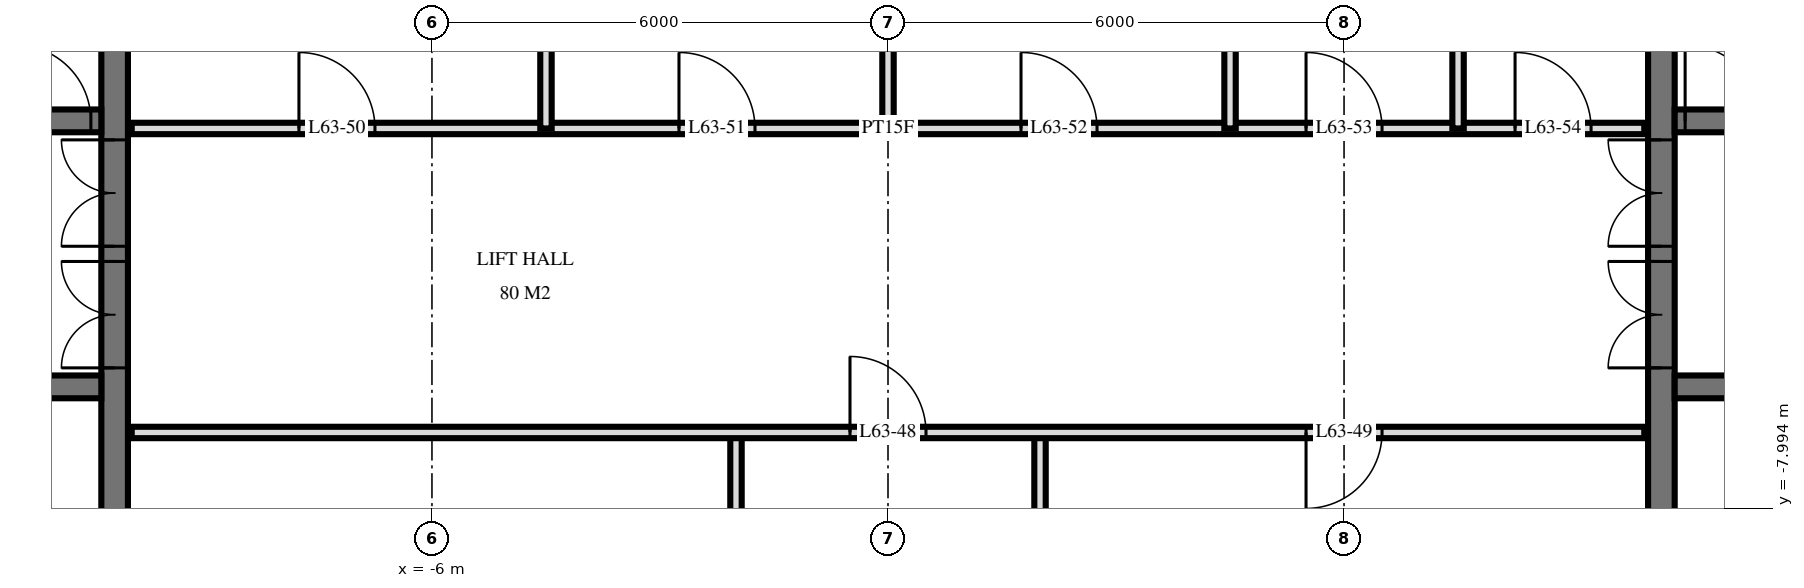
"""IFC4 building model, lengths in metres.
Left out: names, types, materials, properties, quantities, classifications, styles, units other than length and angle.
Written with IfcOpenShell. Run it as: python <this file> out.ifc"""

import sys

from ifc_helpers import new_model, si_unit, direction, frame, frame_2d, origin, place, context, subcontext, project, spatial, rectangle, extrude, element, fill, save


model = new_model("IFC4")
c1 = context("Model", 3, precision=1e-05, world=origin(), true_north=direction((0.0, 1.0)))
c2 = subcontext(c1, "Body", "Model", "MODEL_VIEW")
j1 = project(units=[si_unit("LENGTHUNIT", "METRE"), si_unit("PLANEANGLEUNIT", "RADIAN")], contexts=[c1])
p1 = place(None, origin())
s1 = spatial("IfcSite", under=j1, at=p1, CompositionType="ELEMENT")
p2 = place(p1, origin())
s2 = spatial("IfcBuilding", under=s1, at=p2, CompositionType="ELEMENT")
p3 = place(p2, frame((0.0, 0.0, 239.6)))
s3 = spatial("IfcBuildingStorey", under=s2, at=p3, CompositionType="ELEMENT", Elevation=239.6)
p4 = place(p3, frame((-10.175, -14.55, 0.0), z_axis=(0.0, 0.0, 1.0), x_axis=(0.0, 1.0, 0.0)))
e1 = element("IfcWall", 1, at=p4, inside=s3, PredefinedType="SHEAR", context=c2, shape_type="SweptSolid", body=[
    extrude(rectangle(XDim=14.1, YDim=0.35, at=frame_2d((7.05, 0.0))), origin(), (0.0, 0.0, 1.0), 3.5),
])
p5 = place(p4, frame((8.4, 0.0, 0.0)))
e2 = element("IfcOpeningElement", 2, at=p5, cuts=e1, PredefinedType="OPENING", context=c2, shape_type="SweptSolid", body=[
    extrude(rectangle(XDim=1.4, YDim=2.4, at=frame_2d((0.7, 1.2))), frame((0.0, 0.185, 0.0), z_axis=(0.0, -1.0, 0.0), x_axis=(1.0, 0.0, 0.0)), (0.0, 0.0, 1.0), 0.37),
])
p6 = place(p4, frame((10.0, 0.0, 0.0)))
e3 = element("IfcOpeningElement", 3, at=p6, cuts=e1, PredefinedType="OPENING", context=c2, shape_type="SweptSolid", body=[
    extrude(rectangle(XDim=1.4, YDim=2.4, at=frame_2d((0.7, 1.2))), frame((0.0, 0.185, 0.0), z_axis=(0.0, -1.0, 0.0), x_axis=(1.0, 0.0, 0.0)), (0.0, 0.0, 1.0), 0.37),
])
p7 = place(p4, frame((4.0, 0.0, 0.0)))
e4 = element("IfcOpeningElement", 4, at=p7, cuts=e1, PredefinedType="OPENING", context=c2, shape_type="SweptSolid", body=[
    extrude(rectangle(XDim=1.2, YDim=2.1, at=frame_2d((0.6, 1.05))), frame((0.0, 0.185, 0.0), z_axis=(0.0, -1.0, 0.0), x_axis=(1.0, 0.0, 0.0)), (0.0, 0.0, 1.0), 0.37),
])
p8 = place(p3, frame((-24.05, -2.9, 0.0), z_axis=(0.0, 0.0, 1.0), x_axis=(1.0, 0.0, 0.0)))
e5 = element("IfcWall", 5, at=p8, inside=s3, PredefinedType="SHEAR", context=c2, shape_type="SweptSolid", body=[
    extrude(rectangle(XDim=13.7, YDim=0.3, at=frame_2d((6.85, 0.0))), origin(), (0.0, 0.0, 1.0), 3.5),
])
p9 = place(p8, frame((0.55, 0.0, 0.0)))
e6 = element("IfcOpeningElement", 6, at=p9, cuts=e5, PredefinedType="OPENING", context=c2, shape_type="SweptSolid", body=[
    extrude(rectangle(XDim=1.1, YDim=2.1, at=frame_2d((0.55, 1.05))), frame((0.0, 0.16, 0.0), z_axis=(0.0, -1.0, 0.0), x_axis=(1.0, 0.0, 0.0)), (0.0, 0.0, 1.0), 0.32),
])
p10 = place(p8, frame((6.613, 0.0, 0.0)))
e7 = element("IfcOpeningElement", 7, at=p10, cuts=e5, PredefinedType="OPENING", context=c2, shape_type="SweptSolid", body=[
    extrude(rectangle(XDim=0.9, YDim=2.1, at=frame_2d((0.45, 1.05))), frame((0.0, 0.16, 0.0), z_axis=(0.0, -1.0, 0.0), x_axis=(1.0, 0.0, 0.0)), (0.0, 0.0, 1.0), 0.32),
])
p11 = place(p8, frame((5.188, 0.0, 0.0)))
e8 = element("IfcOpeningElement", 8, at=p11, cuts=e5, PredefinedType="OPENING", context=c2, shape_type="SweptSolid", body=[
    extrude(rectangle(XDim=0.9, YDim=2.1, at=frame_2d((0.45, 1.05))), frame((0.0, 0.16, 0.0), z_axis=(0.0, -1.0, 0.0), x_axis=(1.0, 0.0, 0.0)), (0.0, 0.0, 1.0), 0.32),
])
p12 = place(p8, frame((12.562, 0.0, 0.0)))
e9 = element("IfcOpeningElement", 9, at=p12, cuts=e5, PredefinedType="OPENING", context=c2, shape_type="SweptSolid", body=[
    extrude(rectangle(XDim=1.0, YDim=2.1, at=frame_2d((0.5, 1.05))), frame((0.0, 0.16, 0.0), z_axis=(0.0, -1.0, 0.0), x_axis=(1.0, 0.0, 0.0)), (0.0, 0.0, 1.0), 0.32),
])
p13 = place(p8, frame((11.137, 0.0, 0.0)))
e10 = element("IfcOpeningElement", 10, at=p13, cuts=e5, PredefinedType="OPENING", context=c2, shape_type="SweptSolid", body=[
    extrude(rectangle(XDim=1.0, YDim=2.1, at=frame_2d((0.5, 1.05))), frame((0.0, 0.16, 0.0), z_axis=(0.0, -1.0, 0.0), x_axis=(1.0, 0.0, 0.0)), (0.0, 0.0, 1.0), 0.32),
])
p14 = place(p8, frame((8.85, 0.0, 0.0)))
e11 = element("IfcOpeningElement", 11, at=p14, cuts=e5, PredefinedType="OPENING", context=c2, shape_type="SweptSolid", body=[
    extrude(rectangle(XDim=1.0, YDim=2.1, at=frame_2d((0.5, 1.05))), frame((0.0, 0.16, 0.0), z_axis=(0.0, -1.0, 0.0), x_axis=(1.0, 0.0, 0.0)), (0.0, 0.0, 1.0), 0.32),
])
p15 = place(p8, frame((3.0, 0.0, 0.0)))
e12 = element("IfcOpeningElement", 12, at=p15, cuts=e5, PredefinedType="OPENING", context=c2, shape_type="SweptSolid", body=[
    extrude(rectangle(XDim=1.0, YDim=2.1, at=frame_2d((0.5, 1.05))), frame((0.0, 0.16, 0.0), z_axis=(0.0, -1.0, 0.0), x_axis=(1.0, 0.0, 0.0)), (0.0, 0.0, 1.0), 0.32),
])
p16 = place(p3, frame((-24.05, -6.4, 0.0), z_axis=(0.0, 0.0, 1.0), x_axis=(1.0, 0.0, 0.0)))
e13 = element("IfcWall", 13, at=p16, inside=s3, PredefinedType="SHEAR", context=c2, shape_type="SweptSolid", body=[
    extrude(rectangle(XDim=13.7, YDim=0.3, at=frame_2d((6.85, 0.0))), origin(), (0.0, 0.0, 1.0), 3.5),
])
p17 = place(p16, frame((0.55, 0.0, 0.0)))
e14 = element("IfcOpeningElement", 14, at=p17, cuts=e13, PredefinedType="OPENING", context=c2, shape_type="SweptSolid", body=[
    extrude(rectangle(XDim=1.1, YDim=2.1, at=frame_2d((0.55, 1.05))), frame((0.0, 0.16, 0.0), z_axis=(0.0, -1.0, 0.0), x_axis=(1.0, 0.0, 0.0)), (0.0, 0.0, 1.0), 0.32),
])
p18 = place(p16, frame((5.8, 0.0, 0.0)))
e15 = element("IfcOpeningElement", 15, at=p18, cuts=e13, PredefinedType="OPENING", context=c2, shape_type="SweptSolid", body=[
    extrude(rectangle(XDim=1.1, YDim=2.1, at=frame_2d((0.55, 1.05))), frame((0.0, 0.16, 0.0), z_axis=(0.0, -1.0, 0.0), x_axis=(1.0, 0.0, 0.0)), (0.0, 0.0, 1.0), 0.32),
])
p19 = place(p3, frame((10.175, -14.55, 0.0), z_axis=(0.0, 0.0, 1.0), x_axis=(0.0, 1.0, 0.0)))
e16 = element("IfcWall", 16, at=p19, inside=s3, PredefinedType="SHEAR", context=c2, shape_type="SweptSolid", body=[
    extrude(rectangle(XDim=14.1, YDim=0.35, at=frame_2d((7.05, 0.0))), origin(), (0.0, 0.0, 1.0), 3.5),
])
p20 = place(p19, frame((8.4, 0.0, 0.0)))
e17 = element("IfcOpeningElement", 17, at=p20, cuts=e16, PredefinedType="OPENING", context=c2, shape_type="SweptSolid", body=[
    extrude(rectangle(XDim=1.4, YDim=2.4, at=frame_2d((0.7, 1.2))), frame((0.0, 0.185, 0.0), z_axis=(0.0, -1.0, 0.0), x_axis=(1.0, 0.0, 0.0)), (0.0, 0.0, 1.0), 0.37),
])
p21 = place(p19, frame((10.0, 0.0, 0.0)))
e18 = element("IfcOpeningElement", 18, at=p21, cuts=e16, PredefinedType="OPENING", context=c2, shape_type="SweptSolid", body=[
    extrude(rectangle(XDim=1.4, YDim=2.4, at=frame_2d((0.7, 1.2))), frame((0.0, 0.185, 0.0), z_axis=(0.0, -1.0, 0.0), x_axis=(1.0, 0.0, 0.0)), (0.0, 0.0, 1.0), 0.37),
])
p22 = place(p19, frame((4.0, 0.0, 0.0)))
e19 = element("IfcOpeningElement", 19, at=p22, cuts=e16, PredefinedType="OPENING", context=c2, shape_type="SweptSolid", body=[
    extrude(rectangle(XDim=1.2, YDim=2.1, at=frame_2d((0.6, 1.05))), frame((0.0, 0.185, 0.0), z_axis=(0.0, -1.0, 0.0), x_axis=(1.0, 0.0, 0.0)), (0.0, 0.0, 1.0), 0.37),
])
p23 = place(p3, frame((10.35, -2.9, 0.0), z_axis=(0.0, 0.0, 1.0), x_axis=(1.0, 0.0, 0.0)))
e20 = element("IfcWall", 20, at=p23, inside=s3, PredefinedType="SHEAR", context=c2, shape_type="SweptSolid", body=[
    extrude(rectangle(XDim=13.7, YDim=0.3, at=frame_2d((6.85, 0.0))), origin(), (0.0, 0.0, 1.0), 3.5),
])
p24 = place(p23, frame((12.05, 0.0, 0.0)))
e21 = element("IfcOpeningElement", 21, at=p24, cuts=e20, PredefinedType="OPENING", context=c2, shape_type="SweptSolid", body=[
    extrude(rectangle(XDim=1.1, YDim=2.1, at=frame_2d((0.55, 1.05))), frame((0.0, 0.16, 0.0), z_axis=(0.0, -1.0, 0.0), x_axis=(1.0, 0.0, 0.0)), (0.0, 0.0, 1.0), 0.32),
])
p25 = place(p23, frame((6.188, 0.0, 0.0)))
e22 = element("IfcOpeningElement", 22, at=p25, cuts=e20, PredefinedType="OPENING", context=c2, shape_type="SweptSolid", body=[
    extrude(rectangle(XDim=0.9, YDim=2.1, at=frame_2d((0.45, 1.05))), frame((0.0, 0.16, 0.0), z_axis=(0.0, -1.0, 0.0), x_axis=(1.0, 0.0, 0.0)), (0.0, 0.0, 1.0), 0.32),
])
p26 = place(p23, frame((7.613, 0.0, 0.0)))
e23 = element("IfcOpeningElement", 23, at=p26, cuts=e20, PredefinedType="OPENING", context=c2, shape_type="SweptSolid", body=[
    extrude(rectangle(XDim=0.9, YDim=2.1, at=frame_2d((0.45, 1.05))), frame((0.0, 0.16, 0.0), z_axis=(0.0, -1.0, 0.0), x_axis=(1.0, 0.0, 0.0)), (0.0, 0.0, 1.0), 0.32),
])
p27 = place(p23, frame((0.137, 0.0, 0.0)))
e24 = element("IfcOpeningElement", 24, at=p27, cuts=e20, PredefinedType="OPENING", context=c2, shape_type="SweptSolid", body=[
    extrude(rectangle(XDim=1.0, YDim=2.1, at=frame_2d((0.5, 1.05))), frame((0.0, 0.16, 0.0), z_axis=(0.0, -1.0, 0.0), x_axis=(1.0, 0.0, 0.0)), (0.0, 0.0, 1.0), 0.32),
])
p28 = place(p23, frame((1.562, 0.0, 0.0)))
e25 = element("IfcOpeningElement", 25, at=p28, cuts=e20, PredefinedType="OPENING", context=c2, shape_type="SweptSolid", body=[
    extrude(rectangle(XDim=1.0, YDim=2.1, at=frame_2d((0.5, 1.05))), frame((0.0, 0.16, 0.0), z_axis=(0.0, -1.0, 0.0), x_axis=(1.0, 0.0, 0.0)), (0.0, 0.0, 1.0), 0.32),
])
p29 = place(p23, frame((3.85, 0.0, 0.0)))
e26 = element("IfcOpeningElement", 26, at=p29, cuts=e20, PredefinedType="OPENING", context=c2, shape_type="SweptSolid", body=[
    extrude(rectangle(XDim=1.0, YDim=2.1, at=frame_2d((0.5, 1.05))), frame((0.0, 0.16, 0.0), z_axis=(0.0, -1.0, 0.0), x_axis=(1.0, 0.0, 0.0)), (0.0, 0.0, 1.0), 0.32),
])
p30 = place(p23, frame((9.7, 0.0, 0.0)))
e27 = element("IfcOpeningElement", 27, at=p30, cuts=e20, PredefinedType="OPENING", context=c2, shape_type="SweptSolid", body=[
    extrude(rectangle(XDim=1.0, YDim=2.1, at=frame_2d((0.5, 1.05))), frame((0.0, 0.16, 0.0), z_axis=(0.0, -1.0, 0.0), x_axis=(1.0, 0.0, 0.0)), (0.0, 0.0, 1.0), 0.32),
])
p31 = place(p3, frame((10.35, -6.4, 0.0), z_axis=(0.0, 0.0, 1.0), x_axis=(1.0, 0.0, 0.0)))
e28 = element("IfcWall", 28, at=p31, inside=s3, PredefinedType="SHEAR", context=c2, shape_type="SweptSolid", body=[
    extrude(rectangle(XDim=13.7, YDim=0.3, at=frame_2d((6.85, 0.0))), origin(), (0.0, 0.0, 1.0), 3.5),
])
p32 = place(p31, frame((12.05, 0.0, 0.0)))
e29 = element("IfcOpeningElement", 29, at=p32, cuts=e28, PredefinedType="OPENING", context=c2, shape_type="SweptSolid", body=[
    extrude(rectangle(XDim=1.1, YDim=2.1, at=frame_2d((0.55, 1.05))), frame((0.0, 0.16, 0.0), z_axis=(0.0, -1.0, 0.0), x_axis=(1.0, 0.0, 0.0)), (0.0, 0.0, 1.0), 0.32),
])
p33 = place(p31, frame((6.8, 0.0, 0.0)))
e30 = element("IfcOpeningElement", 30, at=p33, cuts=e28, PredefinedType="OPENING", context=c2, shape_type="SweptSolid", body=[
    extrude(rectangle(XDim=1.1, YDim=2.1, at=frame_2d((0.55, 1.05))), frame((0.0, 0.16, 0.0), z_axis=(0.0, -1.0, 0.0), x_axis=(1.0, 0.0, 0.0)), (0.0, 0.0, 1.0), 0.32),
])
for number, where, z_axis, x_axis in (
    (31, (7.5, -3.0, 0.0), (0.0, 0.0, 1.0), (0.0, 1.0, 0.0)),
    (32, (4.5, -3.0, 0.0), (0.0, 0.0, 1.0), (0.0, 1.0, 0.0)),
):
    element("IfcWall", number, at=place(p3, frame(where, z_axis=z_axis, x_axis=x_axis)), inside=s3, PredefinedType="PLUMBINGWALL", context=c2, shape_type="SweptSolid", body=[
        extrude(rectangle(XDim=4.02, YDim=0.15, at=frame_2d((2.01, 0.0))), origin(), (0.0, 0.0, 1.0), 3.22),
    ])
p34 = place(p3, frame((2.0, -11.0, 0.0), z_axis=(0.0, 0.0, 1.0), x_axis=(0.0, 1.0, 0.0)))
e33 = element("IfcWall", 33, at=p34, inside=s3, PredefinedType="PARTITIONING", context=c2, shape_type="SweptSolid", body=[
    extrude(rectangle(XDim=4.0, YDim=0.15, at=frame_2d((2.0, 0.0))), origin(), (0.0, 0.0, 1.0), 3.22),
])
p35 = place(p3, frame((0.0, -3.0, 0.0), z_axis=(0.0, 0.0, 1.0), x_axis=(0.0, 1.0, 0.0)))
e34 = element("IfcWall", 34, at=p35, inside=s3, PredefinedType="PARTITIONING", context=c2, shape_type="SweptSolid", body=[
    extrude(rectangle(XDim=4.02, YDim=0.15, at=frame_2d((2.01, 0.0))), origin(), (0.0, 0.0, 1.0), 3.22),
])
p36 = place(p3, frame((-2.0, -11.0, 0.0), z_axis=(0.0, 0.0, 1.0), x_axis=(0.0, 1.0, 0.0)))
e35 = element("IfcWall", 35, at=p36, inside=s3, PredefinedType="PARTITIONING", context=c2, shape_type="SweptSolid", body=[
    extrude(rectangle(XDim=4.0, YDim=0.15, at=frame_2d((2.0, 0.0))), origin(), (0.0, 0.0, 1.0), 3.22),
])
p37 = place(p3, frame((-4.5, -3.0, 0.0), z_axis=(0.0, 0.0, 1.0), x_axis=(0.0, 1.0, 0.0)))
e36 = element("IfcWall", 36, at=p37, inside=s3, PredefinedType="PARTITIONING", context=c2, shape_type="SweptSolid", body=[
    extrude(rectangle(XDim=4.02, YDim=0.15, at=frame_2d((2.01, 0.0))), origin(), (0.0, 0.0, 1.0), 3.22),
])
p38 = place(p3, frame((-9.95, -7.0, 0.0), z_axis=(0.0, 0.0, 1.0), x_axis=(1.0, 0.0, 0.0)))
e37 = element("IfcWall", 37, at=p38, inside=s3, PredefinedType="PARTITIONING", context=c2, shape_type="SweptSolid", body=[
    extrude(rectangle(XDim=19.9, YDim=0.15, at=frame_2d((9.95, 0.0))), origin(), (0.0, 0.0, 1.0), 3.22),
])
p39 = place(p38, frame((9.45, 0.0, 0.0)))
e38 = element("IfcOpeningElement", 38, at=p39, cuts=e37, PredefinedType="OPENING", context=c2, shape_type="SweptSolid", body=[
    extrude(rectangle(XDim=1.0, YDim=2.1, at=frame_2d((0.5, 1.05))), frame((0.0, 0.085, 0.0), z_axis=(0.0, -1.0, 0.0), x_axis=(1.0, 0.0, 0.0)), (0.0, 0.0, 1.0), 0.17),
])
p40 = place(p38, frame((15.45, 0.0, 0.0)))
e39 = element("IfcOpeningElement", 39, at=p40, cuts=e37, PredefinedType="OPENING", context=c2, shape_type="SweptSolid", body=[
    extrude(rectangle(XDim=1.0, YDim=2.1, at=frame_2d((0.5, 1.05))), frame((0.0, 0.085, 0.0), z_axis=(0.0, -1.0, 0.0), x_axis=(1.0, 0.0, 0.0)), (0.0, 0.0, 1.0), 0.17),
])
p41 = place(p3, frame((-9.95, -3.0, 0.0), z_axis=(0.0, 0.0, 1.0), x_axis=(1.0, 0.0, 0.0)))
e40 = element("IfcWall", 40, at=p41, inside=s3, PredefinedType="PARTITIONING", context=c2, shape_type="SweptSolid", body=[
    extrude(rectangle(XDim=19.9, YDim=0.15, at=frame_2d((9.95, 0.0))), origin(), (0.0, 0.0, 1.0), 3.22),
])
p42 = place(p41, frame((2.2, 0.0, 0.0)))
e41 = element("IfcOpeningElement", 41, at=p42, cuts=e40, PredefinedType="OPENING", context=c2, shape_type="SweptSolid", body=[
    extrude(rectangle(XDim=1.0, YDim=2.1, at=frame_2d((0.5, 1.05))), frame((0.0, 0.085, 0.0), z_axis=(0.0, -1.0, 0.0), x_axis=(1.0, 0.0, 0.0)), (0.0, 0.0, 1.0), 0.17),
])
p43 = place(p41, frame((7.2, 0.0, 0.0)))
e42 = element("IfcOpeningElement", 42, at=p43, cuts=e40, PredefinedType="OPENING", context=c2, shape_type="SweptSolid", body=[
    extrude(rectangle(XDim=1.0, YDim=2.1, at=frame_2d((0.5, 1.05))), frame((0.0, 0.085, 0.0), z_axis=(0.0, -1.0, 0.0), x_axis=(1.0, 0.0, 0.0)), (0.0, 0.0, 1.0), 0.17),
])
p44 = place(p41, frame((11.7, 0.0, 0.0)))
e43 = element("IfcOpeningElement", 43, at=p44, cuts=e40, PredefinedType="OPENING", context=c2, shape_type="SweptSolid", body=[
    extrude(rectangle(XDim=1.0, YDim=2.1, at=frame_2d((0.5, 1.05))), frame((0.0, 0.085, 0.0), z_axis=(0.0, -1.0, 0.0), x_axis=(1.0, 0.0, 0.0)), (0.0, 0.0, 1.0), 0.17),
])
p45 = place(p41, frame((15.45, 0.0, 0.0)))
e44 = element("IfcOpeningElement", 44, at=p45, cuts=e40, PredefinedType="OPENING", context=c2, shape_type="SweptSolid", body=[
    extrude(rectangle(XDim=1.0, YDim=2.1, at=frame_2d((0.5, 1.05))), frame((0.0, 0.085, 0.0), z_axis=(0.0, -1.0, 0.0), x_axis=(1.0, 0.0, 0.0)), (0.0, 0.0, 1.0), 0.17),
])
p46 = place(p41, frame((18.2, 0.0, 0.0)))
e45 = element("IfcOpeningElement", 45, at=p46, cuts=e40, PredefinedType="OPENING", context=c2, shape_type="SweptSolid", body=[
    extrude(rectangle(XDim=1.0, YDim=2.1, at=frame_2d((0.5, 1.05))), frame((0.0, 0.085, 0.0), z_axis=(0.0, -1.0, 0.0), x_axis=(1.0, 0.0, 0.0)), (0.0, 0.0, 1.0), 0.17),
])
p47 = place(p5, origin())
e46 = element("IfcDoor", 46, at=p47, inside=s3, OperationType="DOUBLE_DOOR_SINGLE_SWING", PredefinedType="DOOR", context=c2, shape_type="SweptSolid", body=[
    extrude(rectangle(XDim=1.4, YDim=2.4, at=frame_2d((0.7, 1.2))), frame((0.0, 0.025, 0.0), z_axis=(0.0, -1.0, 0.0), x_axis=(1.0, 0.0, 0.0)), (0.0, 0.0, 1.0), 0.05),
])
fill(e2, e46)
p48 = place(p6, origin())
e47 = element("IfcDoor", 47, at=p48, inside=s3, OperationType="DOUBLE_DOOR_SINGLE_SWING", PredefinedType="DOOR", context=c2, shape_type="SweptSolid", body=[
    extrude(rectangle(XDim=1.4, YDim=2.4, at=frame_2d((0.7, 1.2))), frame((0.0, 0.025, 0.0), z_axis=(0.0, -1.0, 0.0), x_axis=(1.0, 0.0, 0.0)), (0.0, 0.0, 1.0), 0.05),
])
fill(e3, e47)
p49 = place(p12, origin())
e48 = element("IfcDoor", 48, at=p49, inside=s3, OperationType="SINGLE_SWING_RIGHT", PredefinedType="DOOR", context=c2, shape_type="SweptSolid", body=[
    extrude(rectangle(XDim=1.0, YDim=2.1, at=frame_2d((0.5, 1.05))), frame((0.0, 0.025, 0.0), z_axis=(0.0, -1.0, 0.0), x_axis=(1.0, 0.0, 0.0)), (0.0, 0.0, 1.0), 0.05),
])
fill(e9, e48)
p50 = place(p20, origin())
e49 = element("IfcDoor", 49, at=p50, inside=s3, OperationType="DOUBLE_DOOR_SINGLE_SWING", PredefinedType="DOOR", context=c2, shape_type="SweptSolid", body=[
    extrude(rectangle(XDim=1.4, YDim=2.4, at=frame_2d((0.7, 1.2))), frame((0.0, 0.025, 0.0), z_axis=(0.0, -1.0, 0.0), x_axis=(1.0, 0.0, 0.0)), (0.0, 0.0, 1.0), 0.05),
])
fill(e17, e49)
p51 = place(p21, origin())
e50 = element("IfcDoor", 50, at=p51, inside=s3, OperationType="DOUBLE_DOOR_SINGLE_SWING", PredefinedType="DOOR", context=c2, shape_type="SweptSolid", body=[
    extrude(rectangle(XDim=1.4, YDim=2.4, at=frame_2d((0.7, 1.2))), frame((0.0, 0.025, 0.0), z_axis=(0.0, -1.0, 0.0), x_axis=(1.0, 0.0, 0.0)), (0.0, 0.0, 1.0), 0.05),
])
fill(e18, e50)
p52 = place(p27, origin())
e51 = element("IfcDoor", 51, at=p52, inside=s3, OperationType="SINGLE_SWING_RIGHT", PredefinedType="DOOR", context=c2, shape_type="SweptSolid", body=[
    extrude(rectangle(XDim=1.0, YDim=2.1, at=frame_2d((0.5, 1.05))), frame((0.0, 0.025, 0.0), z_axis=(0.0, -1.0, 0.0), x_axis=(1.0, 0.0, 0.0)), (0.0, 0.0, 1.0), 0.05),
])
fill(e24, e51)
p53 = place(p39, origin())
e52 = element("IfcDoor", 52, at=p53, inside=s3, OperationType="SINGLE_SWING_RIGHT", PredefinedType="DOOR", context=c2, shape_type="SweptSolid", body=[
    extrude(rectangle(XDim=1.0, YDim=2.1, at=frame_2d((0.5, 1.05))), frame((0.0, 0.025, 0.0), z_axis=(0.0, -1.0, 0.0), x_axis=(1.0, 0.0, 0.0)), (0.0, 0.0, 1.0), 0.05),
])
fill(e38, e52)
p54 = place(p40, frame((0.5, 0.0, 0.0), z_axis=(0.0, 0.0, 1.0), x_axis=(-1.0, 0.0, 0.0)))
e53 = element("IfcDoor", 53, at=p54, inside=s3, OperationType="SINGLE_SWING_LEFT", PredefinedType="DOOR", context=c2, shape_type="SweptSolid", body=[
    extrude(rectangle(XDim=1.0, YDim=2.1, at=frame_2d((0.0, 1.05))), frame((0.0, -0.025, 0.0), z_axis=(0.0, 1.0, 0.0), x_axis=(-1.0, 0.0, 0.0)), (0.0, 0.0, 1.0), 0.05),
])
fill(e39, e53)
p55 = place(p42, origin())
e54 = element("IfcDoor", 54, at=p55, inside=s3, OperationType="SINGLE_SWING_RIGHT", PredefinedType="DOOR", context=c2, shape_type="SweptSolid", body=[
    extrude(rectangle(XDim=1.0, YDim=2.1, at=frame_2d((0.5, 1.05))), frame((0.0, 0.025, 0.0), z_axis=(0.0, -1.0, 0.0), x_axis=(1.0, 0.0, 0.0)), (0.0, 0.0, 1.0), 0.05),
])
fill(e41, e54)
p56 = place(p43, origin())
e55 = element("IfcDoor", 55, at=p56, inside=s3, OperationType="SINGLE_SWING_RIGHT", PredefinedType="DOOR", context=c2, shape_type="SweptSolid", body=[
    extrude(rectangle(XDim=1.0, YDim=2.1, at=frame_2d((0.5, 1.05))), frame((0.0, 0.025, 0.0), z_axis=(0.0, -1.0, 0.0), x_axis=(1.0, 0.0, 0.0)), (0.0, 0.0, 1.0), 0.05),
])
fill(e42, e55)
p57 = place(p44, origin())
e56 = element("IfcDoor", 56, at=p57, inside=s3, OperationType="SINGLE_SWING_RIGHT", PredefinedType="DOOR", context=c2, shape_type="SweptSolid", body=[
    extrude(rectangle(XDim=1.0, YDim=2.1, at=frame_2d((0.5, 1.05))), frame((0.0, 0.025, 0.0), z_axis=(0.0, -1.0, 0.0), x_axis=(1.0, 0.0, 0.0)), (0.0, 0.0, 1.0), 0.05),
])
fill(e43, e56)
p58 = place(p45, origin())
e57 = element("IfcDoor", 57, at=p58, inside=s3, OperationType="SINGLE_SWING_RIGHT", PredefinedType="DOOR", context=c2, shape_type="SweptSolid", body=[
    extrude(rectangle(XDim=1.0, YDim=2.1, at=frame_2d((0.5, 1.05))), frame((0.0, 0.025, 0.0), z_axis=(0.0, -1.0, 0.0), x_axis=(1.0, 0.0, 0.0)), (0.0, 0.0, 1.0), 0.05),
])
fill(e44, e57)
p59 = place(p46, origin())
e58 = element("IfcDoor", 58, at=p59, inside=s3, OperationType="SINGLE_SWING_RIGHT", PredefinedType="DOOR", context=c2, shape_type="SweptSolid", body=[
    extrude(rectangle(XDim=1.0, YDim=2.1, at=frame_2d((0.5, 1.05))), frame((0.0, 0.025, 0.0), z_axis=(0.0, -1.0, 0.0), x_axis=(1.0, 0.0, 0.0)), (0.0, 0.0, 1.0), 0.05),
])
fill(e45, e58)
save(model, sys.argv[1])
